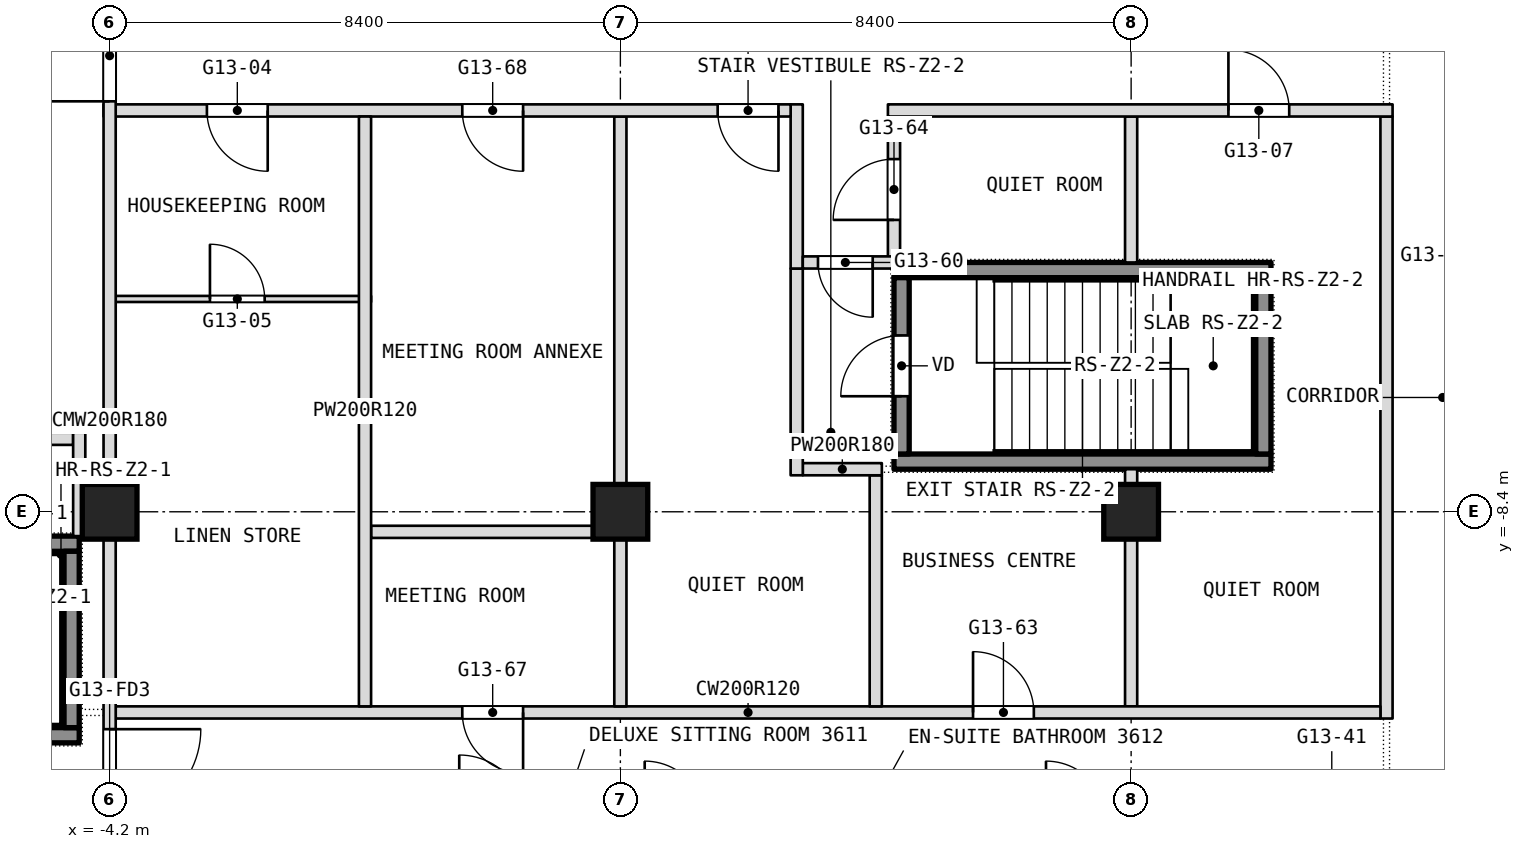
"""IFC4 building model, lengths in metres.
Left out: names, types, materials, properties, quantities, classifications, styles, units other than length and angle.
Written with IfcOpenShell. Run it as: python <this file> out.ifc"""

import sys

from ifc_helpers import new_model, si_unit, direction, frame, frame_2d, origin, origin_2d, place, context, subcontext, project, spatial, rectangle, extrude, element, fill, save


model = new_model("IFC4")
c1 = context("Model", 3, precision=1e-05, world=origin(), true_north=direction((0.0, 1.0)))
c2 = subcontext(c1, "Body", "Model", "MODEL_VIEW")
j1 = project(units=[si_unit("LENGTHUNIT", "METRE"), si_unit("PLANEANGLEUNIT", "RADIAN")], contexts=[c1])
p1 = place(None, origin())
s1 = spatial("IfcSite", under=j1, at=p1, CompositionType="ELEMENT")
p2 = place(p1, origin())
s2 = spatial("IfcBuilding", under=s1, at=p2, CompositionType="ELEMENT")
p3 = place(p2, frame((0.0, 0.0, 155.3)))
s3 = spatial("IfcBuildingStorey", under=s2, at=p3, CompositionType="ELEMENT", Elevation=155.3)
for number, where, z_axis, x_axis in (
    (1, (-4.2, -8.4, 0.0), (0.0, 0.0, 1.0), (1.0, 0.0, 0.0)),
    (2, (4.2, -8.4, 0.0), (0.0, 0.0, 1.0), (1.0, 0.0, 0.0)),
    (3, (12.6, -8.4, 0.0), (0.0, 0.0, 1.0), (1.0, 0.0, 0.0)),
):
    element("IfcColumn", number, at=place(p3, frame(where, z_axis=z_axis, x_axis=x_axis)), inside=s3, PredefinedType="COLUMN", context=c2, shape_type="SweptSolid", body=[
        extrude(rectangle(XDim=0.9, YDim=0.9, at=origin_2d()), origin(), (0.0, 0.0, 1.0), 3.6),
    ])
p4 = place(p3, frame((16.8, -11.8, 0.0), z_axis=(0.0, 0.0, 1.0), x_axis=(0.0, 1.0, 0.0)))
e4 = element("IfcWall", 4, at=p4, inside=s3, PredefinedType="PARTITIONING", context=c2, shape_type="SweptSolid", body=[
    extrude(rectangle(XDim=9.9, YDim=0.2, at=frame_2d((4.95, 0.0))), origin(), (0.0, 0.0, 1.0), 3.34),
])
p5 = place(p3, frame((12.6, -11.6, 0.0), z_axis=(0.0, 0.0, 1.0), x_axis=(0.0, 1.0, 0.0)))
e5 = element("IfcWall", 5, at=p5, inside=s3, PredefinedType="PARTITIONING", context=c2, shape_type="SweptSolid", body=[
    extrude(rectangle(XDim=3.9, YDim=0.2, at=frame_2d((1.95, 0.0))), origin(), (0.0, 0.0, 1.0), 3.34),
])
p6 = place(p3, frame((12.6, -4.3, 0.0), z_axis=(0.0, 0.0, 1.0), x_axis=(0.0, 1.0, 0.0)))
e6 = element("IfcWall", 6, at=p6, inside=s3, PredefinedType="PARTITIONING", context=c2, shape_type="SweptSolid", body=[
    extrude(rectangle(XDim=2.4, YDim=0.2, at=frame_2d((1.2, 0.0))), origin(), (0.0, 0.0, 1.0), 3.34),
])
p7 = place(p3, frame((-4.1, -11.7, 0.0), z_axis=(0.0, 0.0, 1.0), x_axis=(1.0, 0.0, 0.0)))
e7 = element("IfcWall", 7, at=p7, inside=s3, PredefinedType="PARTITIONING", context=c2, shape_type="SweptSolid", body=[
    extrude(rectangle(XDim=20.8, YDim=0.2, at=frame_2d((10.4, 0.0))), origin(), (0.0, 0.0, 1.0), 3.34),
])
p8 = place(p7, frame((14.1, 0.0, 0.0)))
e8 = element("IfcOpeningElement", 8, at=p8, cuts=e7, PredefinedType="OPENING", context=c2, shape_type="SweptSolid", body=[
    extrude(rectangle(XDim=1.0, YDim=2.1, at=frame_2d((0.5, 1.05))), frame((0.0, 0.1, 0.0), z_axis=(0.0, -1.0, 0.0), x_axis=(1.0, 0.0, 0.0)), (0.0, 0.0, 1.0), 0.2),
])
p9 = place(p7, frame((5.7, 0.0, 0.0)))
e9 = element("IfcOpeningElement", 9, at=p9, cuts=e7, PredefinedType="OPENING", context=c2, shape_type="SweptSolid", body=[
    extrude(rectangle(XDim=1.0, YDim=2.1, at=frame_2d((0.5, 1.05))), frame((0.0, 0.1, 0.0), z_axis=(0.0, -1.0, 0.0), x_axis=(1.0, 0.0, 0.0)), (0.0, 0.0, 1.0), 0.2),
])
p10 = place(p3, frame((0.1, -8.73, 0.0), z_axis=(0.0, 0.0, 1.0), x_axis=(1.0, 0.0, 0.0)))
e10 = element("IfcWall", 10, at=p10, inside=s3, PredefinedType="PARTITIONING", context=c2, shape_type="SweptSolid", body=[
    extrude(rectangle(XDim=4.0, YDim=0.2, at=frame_2d((2.0, 0.0))), origin(), (0.0, 0.0, 1.0), 3.34),
])
p11 = place(p3, frame((8.7, -4.3, 0.0), z_axis=(0.0, 0.0, 1.0), x_axis=(0.0, 1.0, 0.0)))
e11 = element("IfcWall", 11, at=p11, inside=s3, PredefinedType="PARTITIONING", context=c2, shape_type="SweptSolid", body=[
    extrude(rectangle(XDim=2.4, YDim=0.2, at=frame_2d((1.2, 0.0))), origin(), (0.0, 0.0, 1.0), 3.34),
])
p12 = place(p11, frame((0.7, 0.0, 0.0)))
e12 = element("IfcOpeningElement", 12, at=p12, cuts=e11, PredefinedType="OPENING", context=c2, shape_type="SweptSolid", body=[
    extrude(rectangle(XDim=1.0, YDim=2.1, at=frame_2d((0.5, 1.05))), frame((0.0, 0.1, 0.0), z_axis=(0.0, -1.0, 0.0), x_axis=(1.0, 0.0, 0.0)), (0.0, 0.0, 1.0), 0.2),
])
p13 = place(p3, frame((8.4, -11.6, 0.0), z_axis=(0.0, 0.0, 1.0), x_axis=(0.0, 1.0, 0.0)))
e13 = element("IfcWall", 13, at=p13, inside=s3, PredefinedType="PARTITIONING", context=c2, shape_type="SweptSolid", body=[
    extrude(rectangle(XDim=3.8, YDim=0.2, at=frame_2d((1.9, 0.0))), origin(), (0.0, 0.0, 1.0), 3.34),
])
p14 = place(p3, frame((7.2, -7.7, 0.0), z_axis=(0.0, 0.0, 1.0), x_axis=(1.0, 0.0, 0.0)))
e14 = element("IfcWall", 14, at=p14, inside=s3, PredefinedType="PARTITIONING", context=c2, shape_type="SweptSolid", body=[
    extrude(rectangle(XDim=1.3, YDim=0.2, at=frame_2d((0.65, 0.0))), origin(), (0.0, 0.0, 1.0), 3.34),
])
p15 = place(p3, frame((-8.5, -7.2, 0.0), z_axis=(0.0, 0.0, 1.0), x_axis=(1.0, 0.0, 0.0)))
e15 = element("IfcWall", 15, at=p15, inside=s3, PredefinedType="PARTITIONING", context=c2, shape_type="SweptSolid", body=[
    extrude(rectangle(XDim=3.7, YDim=0.2, at=frame_2d((1.85, 0.0))), origin(), (0.0, 0.0, 1.0), 3.34),
])
p16 = place(p15, frame((0.25, 0.0, 0.0)))
e16 = element("IfcOpeningElement", 16, at=p16, cuts=e15, PredefinedType="OPENING", context=c2, shape_type="SweptSolid", body=[
    extrude(rectangle(XDim=0.9, YDim=2.1, at=frame_2d((0.45, 1.05))), frame((0.0, 0.1, 0.0), z_axis=(0.0, -1.0, 0.0), x_axis=(1.0, 0.0, 0.0)), (0.0, 0.0, 1.0), 0.2),
])
p17 = place(p3, frame((7.1, -7.8, 0.0), z_axis=(0.0, 0.0, 1.0), x_axis=(0.0, 1.0, 0.0)))
e17 = element("IfcWall", 17, at=p17, inside=s3, PredefinedType="PARTITIONING", context=c2, shape_type="SweptSolid", body=[
    extrude(rectangle(XDim=3.4, YDim=0.2, at=frame_2d((1.7, 0.0))), origin(), (0.0, 0.0, 1.0), 3.34),
])
p18 = place(p3, frame((7.1, -4.4, 0.0), z_axis=(0.0, 0.0, 1.0), x_axis=(0.0, 1.0, 0.0)))
e18 = element("IfcWall", 18, at=p18, inside=s3, PredefinedType="PARTITIONING", context=c2, shape_type="SweptSolid", body=[
    extrude(rectangle(XDim=2.7, YDim=0.2, at=frame_2d((1.35, 0.0))), origin(), (0.0, 0.0, 1.0), 3.34),
])
p19 = place(p3, frame((-4.1, -4.9, 0.0), z_axis=(0.0, 0.0, 1.0), x_axis=(1.0, 0.0, 0.0)))
e19 = element("IfcWall", 19, at=p19, inside=s3, PredefinedType="PARTITIONING", context=c2, shape_type="SweptSolid", body=[
    extrude(rectangle(XDim=4.2, YDim=0.1, at=frame_2d((2.1, 0.0))), origin(), (0.0, 0.0, 1.0), 3.34),
])
p20 = place(p19, frame((1.55, 0.0, 0.0)))
e20 = element("IfcOpeningElement", 20, at=p20, cuts=e19, PredefinedType="OPENING", context=c2, shape_type="SweptSolid", body=[
    extrude(rectangle(XDim=0.9, YDim=2.1, at=frame_2d((0.45, 1.05))), frame((0.0, 0.05, 0.0), z_axis=(0.0, -1.0, 0.0), x_axis=(1.0, 0.0, 0.0)), (0.0, 0.0, 1.0), 0.1),
])
p21 = place(p3, frame((7.2, -4.3, 0.0), z_axis=(0.0, 0.0, 1.0), x_axis=(1.0, 0.0, 0.0)))
e21 = element("IfcWall", 21, at=p21, inside=s3, PredefinedType="PARTITIONING", context=c2, shape_type="SweptSolid", body=[
    extrude(rectangle(XDim=1.5, YDim=0.2, at=frame_2d((0.75, 0.0))), origin(), (0.0, 0.0, 1.0), 3.34),
])
p22 = place(p21, frame((0.25, 0.0, 0.0)))
e22 = element("IfcOpeningElement", 22, at=p22, cuts=e21, PredefinedType="OPENING", context=c2, shape_type="SweptSolid", body=[
    extrude(rectangle(XDim=0.9, YDim=2.1, at=frame_2d((0.45, 1.05))), frame((0.0, 0.1, 0.0), z_axis=(0.0, -1.0, 0.0), x_axis=(1.0, 0.0, 0.0)), (0.0, 0.0, 1.0), 0.2),
])
p23 = place(p3, frame((4.2, -11.6, 0.0), z_axis=(0.0, 0.0, 1.0), x_axis=(0.0, 1.0, 0.0)))
e23 = element("IfcWall", 23, at=p23, inside=s3, PredefinedType="PARTITIONING", context=c2, shape_type="SweptSolid", body=[
    extrude(rectangle(XDim=9.7, YDim=0.2, at=frame_2d((4.85, 0.0))), origin(), (0.0, 0.0, 1.0), 3.34),
])
p24 = place(p3, frame((-4.3, -1.8, 0.0), z_axis=(0.0, 0.0, 1.0), x_axis=(1.0, 0.0, 0.0)))
e24 = element("IfcWall", 24, at=p24, inside=s3, PredefinedType="PARTITIONING", context=c2, shape_type="SweptSolid", body=[
    extrude(rectangle(XDim=11.3, YDim=0.2, at=frame_2d((5.65, 0.0))), origin(), (0.0, 0.0, 1.0), 3.34),
])
p25 = place(p24, frame((1.7, 0.0, 0.0)))
e25 = element("IfcOpeningElement", 25, at=p25, cuts=e24, PredefinedType="OPENING", context=c2, shape_type="SweptSolid", body=[
    extrude(rectangle(XDim=1.0, YDim=2.1, at=frame_2d((0.5, 1.05))), frame((0.0, 0.1, 0.0), z_axis=(0.0, -1.0, 0.0), x_axis=(1.0, 0.0, 0.0)), (0.0, 0.0, 1.0), 0.2),
])
p26 = place(p24, frame((10.1, 0.0, 0.0)))
e26 = element("IfcOpeningElement", 26, at=p26, cuts=e24, PredefinedType="OPENING", context=c2, shape_type="SweptSolid", body=[
    extrude(rectangle(XDim=1.0, YDim=2.1, at=frame_2d((0.5, 1.05))), frame((0.0, 0.1, 0.0), z_axis=(0.0, -1.0, 0.0), x_axis=(1.0, 0.0, 0.0)), (0.0, 0.0, 1.0), 0.2),
])
p27 = place(p24, frame((5.9, 0.0, 0.0)))
e27 = element("IfcOpeningElement", 27, at=p27, cuts=e24, PredefinedType="OPENING", context=c2, shape_type="SweptSolid", body=[
    extrude(rectangle(XDim=1.0, YDim=2.1, at=frame_2d((0.5, 1.05))), frame((0.0, 0.1, 0.0), z_axis=(0.0, -1.0, 0.0), x_axis=(1.0, 0.0, 0.0)), (0.0, 0.0, 1.0), 0.2),
])
p28 = place(p3, frame((8.6, -1.8, 0.0), z_axis=(0.0, 0.0, 1.0), x_axis=(1.0, 0.0, 0.0)))
e28 = element("IfcWall", 28, at=p28, inside=s3, PredefinedType="PARTITIONING", context=c2, shape_type="SweptSolid", body=[
    extrude(rectangle(XDim=8.3, YDim=0.2, at=frame_2d((4.15, 0.0))), origin(), (0.0, 0.0, 1.0), 3.34),
])
p29 = place(p28, frame((5.6, 0.0, 0.0)))
e29 = element("IfcOpeningElement", 29, at=p29, cuts=e28, PredefinedType="OPENING", context=c2, shape_type="SweptSolid", body=[
    extrude(rectangle(XDim=1.0, YDim=2.1, at=frame_2d((0.5, 1.05))), frame((0.0, 0.1, 0.0), z_axis=(0.0, -1.0, 0.0), x_axis=(1.0, 0.0, 0.0)), (0.0, 0.0, 1.0), 0.2),
])
p30 = place(p3, frame((0.0, -11.6, 0.0), z_axis=(0.0, 0.0, 1.0), x_axis=(0.0, 1.0, 0.0)))
e30 = element("IfcWall", 30, at=p30, inside=s3, PredefinedType="PARTITIONING", context=c2, shape_type="SweptSolid", body=[
    extrude(rectangle(XDim=9.7, YDim=0.2, at=frame_2d((4.85, 0.0))), origin(), (0.0, 0.0, 1.0), 3.34),
])
p31 = place(p3, frame((-4.2, -13.8, 0.0), z_axis=(0.0, 0.0, 1.0), x_axis=(0.0, 1.0, 0.0)))
e31 = element("IfcWall", 31, at=p31, inside=s3, PredefinedType="PARTITIONING", context=c2, shape_type="SweptSolid", body=[
    extrude(rectangle(XDim=13.8, YDim=0.2, at=frame_2d((6.9, 0.0))), origin(), (0.0, 0.0, 1.0), 3.34),
])
p32 = place(p31, frame((12.15, 0.0, 0.0)))
e32 = element("IfcOpeningElement", 32, at=p32, cuts=e31, PredefinedType="OPENING", context=c2, shape_type="SweptSolid", body=[
    extrude(rectangle(XDim=1.5, YDim=2.1, at=frame_2d((0.75, 1.05))), frame((0.0, 0.1, 0.0), z_axis=(0.0, -1.0, 0.0), x_axis=(1.0, 0.0, 0.0)), (0.0, 0.0, 1.0), 0.2),
])
p33 = place(p31, frame((0.325, 0.0, 0.0)))
e33 = element("IfcOpeningElement", 33, at=p33, cuts=e31, PredefinedType="OPENING", context=c2, shape_type="SweptSolid", body=[
    extrude(rectangle(XDim=1.5, YDim=2.1, at=frame_2d((0.75, 1.05))), frame((0.0, 0.1, 0.0), z_axis=(0.0, -1.0, 0.0), x_axis=(1.0, 0.0, 0.0)), (0.0, 0.0, 1.0), 0.2),
])
p34 = place(p3, frame((-4.7, -8.8, 0.0), z_axis=(0.0, 0.0, 1.0), x_axis=(0.0, 1.0, 0.0)))
e34 = element("IfcWall", 34, at=p34, inside=s3, PredefinedType="PARTITIONING", context=c2, shape_type="SweptSolid", body=[
    extrude(rectangle(XDim=1.7, YDim=0.2, at=frame_2d((0.85, 0.0))), origin(), (0.0, 0.0, 1.0), 3.34),
])
p35 = place(p3, frame((-10.9, -12.075, 0.1), z_axis=(0.0, 0.0, 1.0), x_axis=(1.0, 0.0, 0.0)))
e35 = element("IfcWall", 35, at=p35, inside=s3, PredefinedType="SHEAR", context=c2, shape_type="SweptSolid", body=[
    extrude(rectangle(XDim=6.2, YDim=0.25, at=frame_2d((3.1, 0.0))), origin(), (0.0, 0.0, 1.0), 3.6),
])
p36 = place(p3, frame((-10.9, -8.925, 0.1), z_axis=(0.0, 0.0, 1.0), x_axis=(1.0, 0.0, 0.0)))
e36 = element("IfcWall", 36, at=p36, inside=s3, PredefinedType="SHEAR", context=c2, shape_type="SweptSolid", body=[
    extrude(rectangle(XDim=6.2, YDim=0.25, at=frame_2d((3.1, 0.0))), origin(), (0.0, 0.0, 1.0), 3.6),
])
p37 = place(p36, frame((0.45, 0.0, 0.0)))
e37 = element("IfcOpeningElement", 37, at=p37, cuts=e36, PredefinedType="OPENING", context=c2, shape_type="SweptSolid", body=[
    extrude(rectangle(XDim=1.0, YDim=2.1, at=frame_2d((0.5, 1.05))), frame((0.0, 0.125, 0.0), z_axis=(0.0, -1.0, 0.0), x_axis=(1.0, 0.0, 0.0)), (0.0, 0.0, 1.0), 0.25),
])
p38 = place(p3, frame((-4.825, -11.95, 0.1), z_axis=(0.0, 0.0, 1.0), x_axis=(0.0, 1.0, 0.0)))
e38 = element("IfcWall", 38, at=p38, inside=s3, PredefinedType="SHEAR", context=c2, shape_type="SweptSolid", body=[
    extrude(rectangle(XDim=2.9, YDim=0.25, at=frame_2d((1.45, 0.0))), origin(), (0.0, 0.0, 1.0), 3.6),
])
for number, where, z_axis, x_axis in (
    (39, (8.7, -7.575, 0.1), (0.0, 0.0, 1.0), (1.0, 0.0, 0.0)),
    (40, (8.7, -4.425, 0.1), (0.0, 0.0, 1.0), (1.0, 0.0, 0.0)),
):
    element("IfcWall", number, at=place(p3, frame(where, z_axis=z_axis, x_axis=x_axis)), inside=s3, PredefinedType="SHEAR", context=c2, shape_type="SweptSolid", body=[
        extrude(rectangle(XDim=6.2, YDim=0.25, at=frame_2d((3.1, 0.0))), origin(), (0.0, 0.0, 1.0), 3.6),
    ])
p39 = place(p3, frame((8.825, -7.45, 0.1), z_axis=(0.0, 0.0, 1.0), x_axis=(0.0, 1.0, 0.0)))
e41 = element("IfcWall", 41, at=p39, inside=s3, PredefinedType="SHEAR", context=c2, shape_type="SweptSolid", body=[
    extrude(rectangle(XDim=2.9, YDim=0.25, at=frame_2d((1.45, 0.0))), origin(), (0.0, 0.0, 1.0), 3.6),
])
p40 = place(p39, frame((0.95, 0.0, 0.0)))
e42 = element("IfcOpeningElement", 42, at=p40, cuts=e41, PredefinedType="OPENING", context=c2, shape_type="SweptSolid", body=[
    extrude(rectangle(XDim=1.0, YDim=2.1, at=frame_2d((0.5, 1.05))), frame((0.0, 0.125, 0.0), z_axis=(0.0, -1.0, 0.0), x_axis=(1.0, 0.0, 0.0)), (0.0, 0.0, 1.0), 0.25),
])
p41 = place(p3, frame((14.775, -7.45, 0.1), z_axis=(0.0, 0.0, 1.0), x_axis=(0.0, 1.0, 0.0)))
e43 = element("IfcWall", 43, at=p41, inside=s3, PredefinedType="SHEAR", context=c2, shape_type="SweptSolid", body=[
    extrude(rectangle(XDim=2.9, YDim=0.25, at=frame_2d((1.45, 0.0))), origin(), (0.0, 0.0, 1.0), 3.6),
])
p42 = place(p8, origin())
e44 = element("IfcDoor", 44, at=p42, inside=s3, OperationType="SINGLE_SWING_LEFT", PredefinedType="DOOR", context=c2, shape_type="SweptSolid", body=[
    extrude(rectangle(XDim=1.0, YDim=2.1, at=frame_2d((0.5, 1.05))), frame((0.0, 0.025, 0.0), z_axis=(0.0, -1.0, 0.0), x_axis=(1.0, 0.0, 0.0)), (0.0, 0.0, 1.0), 0.05),
])
fill(e8, e44)
p43 = place(p9, origin())
e45 = element("IfcDoor", 45, at=p43, inside=s3, OperationType="SINGLE_SWING_LEFT", PredefinedType="DOOR", context=c2, shape_type="SweptSolid", body=[
    extrude(rectangle(XDim=1.0, YDim=2.1, at=frame_2d((0.5, 1.05))), frame((0.0, 0.025, 0.0), z_axis=(0.0, -1.0, 0.0), x_axis=(1.0, 0.0, 0.0)), (0.0, 0.0, 1.0), 0.05),
])
fill(e9, e45)
p44 = place(p12, origin())
e46 = element("IfcDoor", 46, at=p44, inside=s3, OperationType="SINGLE_SWING_LEFT", PredefinedType="DOOR", context=c2, shape_type="SweptSolid", body=[
    extrude(rectangle(XDim=1.0, YDim=2.1, at=frame_2d((0.5, 1.05))), frame((0.0, 0.025, 0.0), z_axis=(0.0, -1.0, 0.0), x_axis=(1.0, 0.0, 0.0)), (0.0, 0.0, 1.0), 0.05),
])
fill(e12, e46)
p45 = place(p20, origin())
e47 = element("IfcDoor", 47, at=p45, inside=s3, OperationType="SINGLE_SWING_LEFT", PredefinedType="DOOR", context=c2, shape_type="SweptSolid", body=[
    extrude(rectangle(XDim=0.9, YDim=2.1, at=frame_2d((0.45, 1.05))), frame((0.0, 0.025, 0.0), z_axis=(0.0, -1.0, 0.0), x_axis=(1.0, 0.0, 0.0)), (0.0, 0.0, 1.0), 0.05),
])
fill(e20, e47)
p46 = place(p22, origin())
e48 = element("IfcDoor", 48, at=p46, inside=s3, OperationType="SINGLE_SWING_RIGHT", PredefinedType="DOOR", context=c2, shape_type="SweptSolid", body=[
    extrude(rectangle(XDim=0.9, YDim=2.1, at=frame_2d((0.45, 1.05))), frame((0.0, 0.025, 0.0), z_axis=(0.0, -1.0, 0.0), x_axis=(1.0, 0.0, 0.0)), (0.0, 0.0, 1.0), 0.05),
])
fill(e22, e48)
p47 = place(p25, origin())
e49 = element("IfcDoor", 49, at=p47, inside=s3, OperationType="SINGLE_SWING_RIGHT", PredefinedType="DOOR", context=c2, shape_type="SweptSolid", body=[
    extrude(rectangle(XDim=1.0, YDim=2.1, at=frame_2d((0.5, 1.05))), frame((0.0, 0.025, 0.0), z_axis=(0.0, -1.0, 0.0), x_axis=(1.0, 0.0, 0.0)), (0.0, 0.0, 1.0), 0.05),
])
fill(e25, e49)
p48 = place(p26, origin())
e50 = element("IfcDoor", 50, at=p48, inside=s3, OperationType="SINGLE_SWING_LEFT", PredefinedType="DOOR", context=c2, shape_type="SweptSolid", body=[
    extrude(rectangle(XDim=1.0, YDim=2.1, at=frame_2d((0.5, 1.05))), frame((0.0, 0.025, 0.0), z_axis=(0.0, -1.0, 0.0), x_axis=(1.0, 0.0, 0.0)), (0.0, 0.0, 1.0), 0.05),
])
fill(e26, e50)
p49 = place(p27, origin())
e51 = element("IfcDoor", 51, at=p49, inside=s3, OperationType="SINGLE_SWING_RIGHT", PredefinedType="DOOR", context=c2, shape_type="SweptSolid", body=[
    extrude(rectangle(XDim=1.0, YDim=2.1, at=frame_2d((0.5, 1.05))), frame((0.0, 0.025, 0.0), z_axis=(0.0, -1.0, 0.0), x_axis=(1.0, 0.0, 0.0)), (0.0, 0.0, 1.0), 0.05),
])
fill(e27, e51)
p50 = place(p29, origin())
e52 = element("IfcDoor", 52, at=p50, inside=s3, OperationType="SINGLE_SWING_LEFT", PredefinedType="DOOR", context=c2, shape_type="SweptSolid", body=[
    extrude(rectangle(XDim=1.0, YDim=2.1, at=frame_2d((0.5, 1.05))), frame((0.0, 0.025, 0.0), z_axis=(0.0, -1.0, 0.0), x_axis=(1.0, 0.0, 0.0)), (0.0, 0.0, 1.0), 0.05),
])
fill(e29, e52)
p51 = place(p40, origin())
e53 = element("IfcDoor", 53, at=p51, inside=s3, OperationType="SINGLE_SWING_LEFT", PredefinedType="DOOR", context=c2, shape_type="SweptSolid", body=[
    extrude(rectangle(XDim=1.0, YDim=2.1, at=frame_2d((0.5, 1.05))), frame((0.0, 0.025, 0.0), z_axis=(0.0, -1.0, 0.0), x_axis=(1.0, 0.0, 0.0)), (0.0, 0.0, 1.0), 0.05),
])
fill(e42, e53)
p52 = place(p32, origin())
e54 = element("IfcDoor", 54, at=p52, inside=s3, OperationType="DOUBLE_DOOR_DOUBLE_SWING", PredefinedType="DOOR", context=c2, shape_type="SweptSolid", body=[
    extrude(rectangle(XDim=1.5, YDim=2.1, at=frame_2d((0.75, 1.05))), frame((0.0, 0.025, 0.0), z_axis=(0.0, -1.0, 0.0), x_axis=(1.0, 0.0, 0.0)), (0.0, 0.0, 1.0), 0.05),
])
fill(e32, e54)
p53 = place(p33, origin())
e55 = element("IfcDoor", 55, at=p53, inside=s3, OperationType="DOUBLE_DOOR_DOUBLE_SWING", PredefinedType="DOOR", context=c2, shape_type="SweptSolid", body=[
    extrude(rectangle(XDim=1.5, YDim=2.1, at=frame_2d((0.75, 1.05))), frame((0.0, 0.025, 0.0), z_axis=(0.0, -1.0, 0.0), x_axis=(1.0, 0.0, 0.0)), (0.0, 0.0, 1.0), 0.05),
])
fill(e33, e55)
save(model, sys.argv[1])
